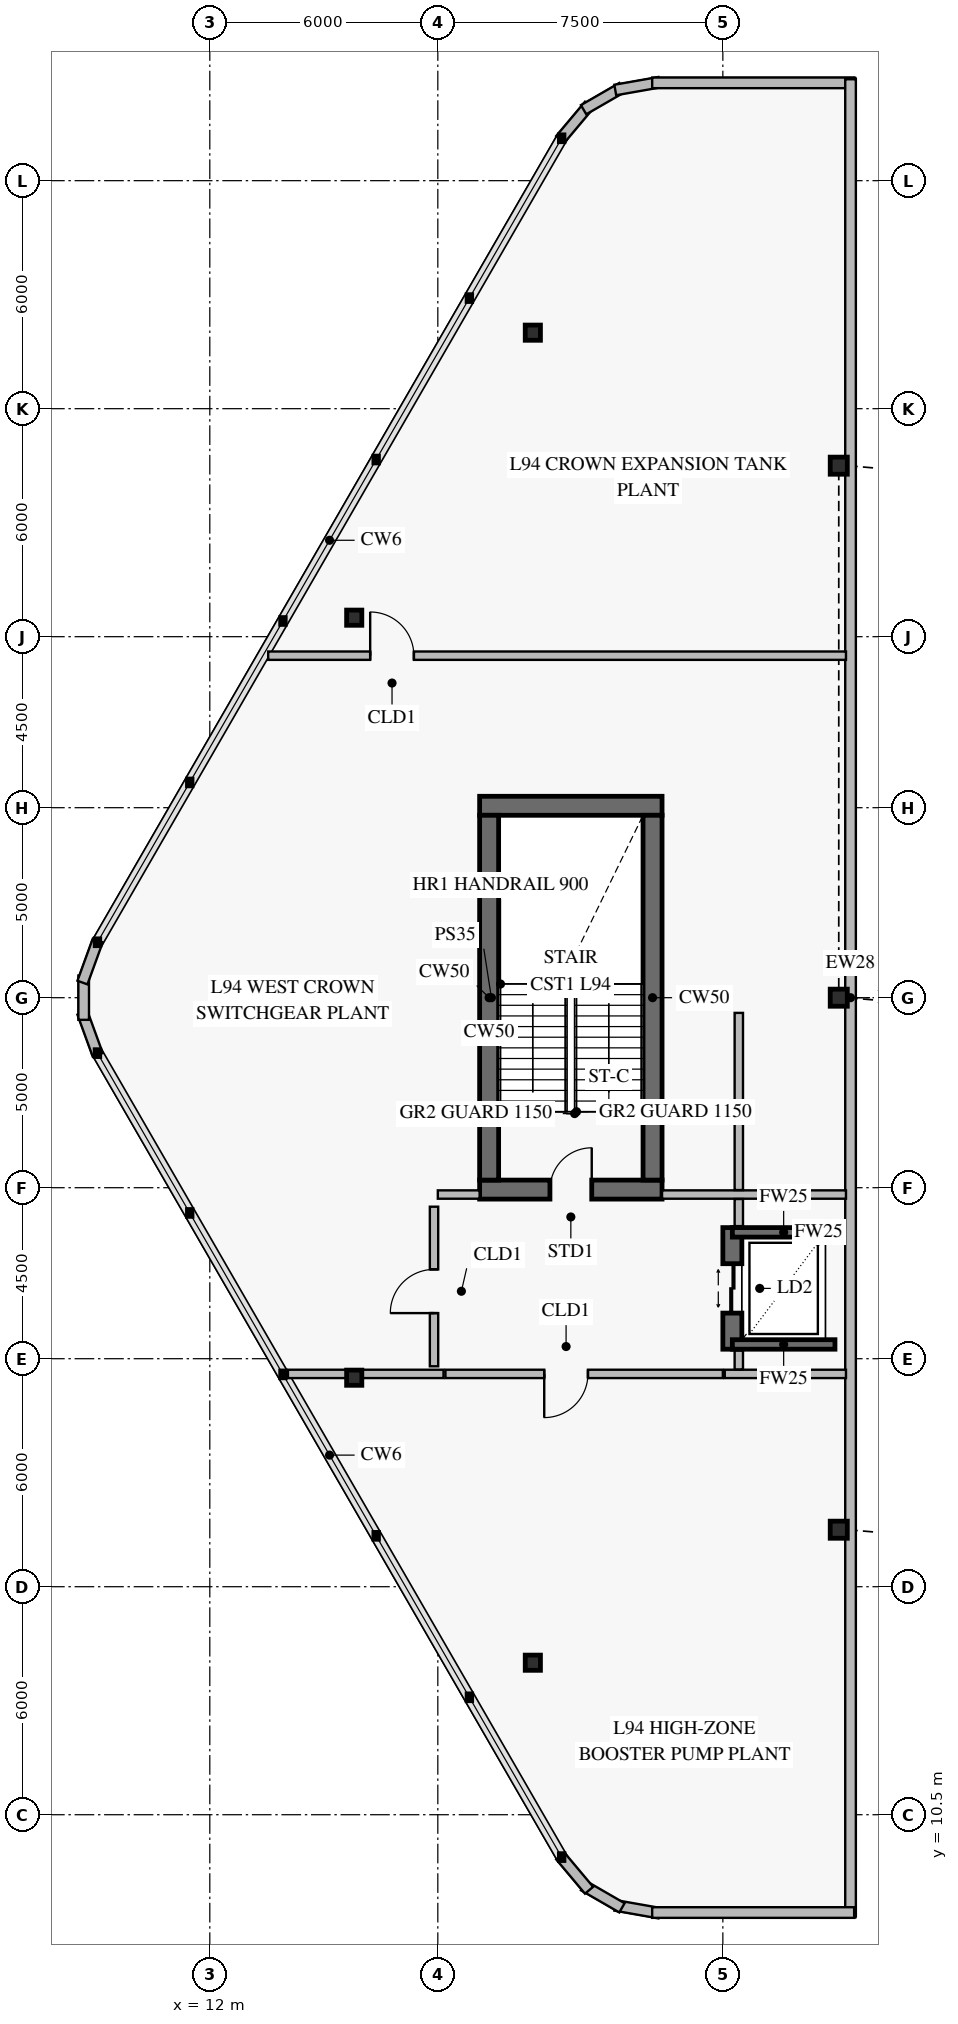
"""IFC4 building model, lengths in metres.
Left out: names, types, materials, properties, quantities, classifications, styles, units other than length and angle.
Written with IfcOpenShell. Run it as: python <this file> out.ifc"""

import sys

from ifc_helpers import new_model, si_unit, direction, frame, frame_2d, origin, origin_2d, place, context, subcontext, project, spatial, rectangle, hollow_rectangle, i_section, extrude, element, fill, save


model = new_model("IFC4")
c1 = context("Model", 3, precision=1e-05, world=origin(), true_north=direction((0.0, 1.0)))
c2 = subcontext(c1, "Body", "Model", "MODEL_VIEW")
j1 = project(units=[si_unit("LENGTHUNIT", "METRE"), si_unit("PLANEANGLEUNIT", "RADIAN")], contexts=[c1])
p1 = place(None, origin())
s1 = spatial("IfcSite", under=j1, at=p1, CompositionType="ELEMENT")
p2 = place(p1, origin())
s2 = spatial("IfcBuilding", under=s1, at=p2, CompositionType="ELEMENT")
p3 = place(p2, frame((0.0, 0.0, 370.2)))
s3 = spatial("IfcBuildingStorey", under=s2, at=p3, CompositionType="ELEMENT", Elevation=370.2)
p4 = place(p3, frame((19.1, 26.95, 0.0), z_axis=(0.0, 0.0, 1.0), x_axis=(1.0, 0.0, 0.0)))
e1 = element("IfcWall", 1, at=p4, inside=s3, PredefinedType="SHEAR", context=c2, shape_type="SweptSolid", body=[
    extrude(rectangle(XDim=4.8, YDim=0.5, at=frame_2d((2.4, 0.0))), origin(), (0.0, 0.0, 1.0), 4.4),
])
p5 = place(p4, frame((1.85, 0.0, 0.0)))
e2 = element("IfcOpeningElement", 2, at=p5, cuts=e1, PredefinedType="OPENING", context=c2, shape_type="SweptSolid", body=[
    extrude(rectangle(XDim=1.1, YDim=2.15, at=frame_2d((0.55, 1.075))), frame((0.0, 0.262, 0.0), z_axis=(0.0, -1.0, 0.0), x_axis=(1.0, 0.0, 0.0)), (0.0, 0.0, 1.0), 0.524),
])
p6 = place(p3, frame((23.9, 37.05, 0.0), z_axis=(0.0, 0.0, 1.0), x_axis=(-1.0, 0.0, 0.0)))
e3 = element("IfcWall", 3, at=p6, inside=s3, PredefinedType="SHEAR", context=c2, shape_type="SweptSolid", body=[
    extrude(rectangle(XDim=4.8, YDim=0.5, at=frame_2d((2.4, 0.0))), origin(), (0.0, 0.0, 1.0), 4.4),
])
for number, where, z_axis, x_axis in (
    (4, (19.35, 27.2, 0.0), (0.0, 0.0, 1.0), (0.0, 1.0, 0.0)),
    (5, (23.65, 36.8, 0.0), (0.0, 0.0, 1.0), (0.0, -1.0, 0.0)),
):
    element("IfcWall", number, at=place(p3, frame(where, z_axis=z_axis, x_axis=x_axis)), inside=s3, PredefinedType="SHEAR", context=c2, shape_type="SweptSolid", body=[
        extrude(rectangle(XDim=9.6, YDim=0.5, at=frame_2d((4.8, 0.0))), origin(), (0.0, 0.0, 1.0), 4.4),
    ])
p7 = place(p3, frame((25.75, 22.75, 0.0), z_axis=(0.0, 0.0, 1.0), x_axis=(0.0, 1.0, 0.0)))
e6 = element("IfcWall", 6, at=p7, inside=s3, PredefinedType="SHEAR", context=c2, shape_type="SweptSolid", body=[
    extrude(rectangle(XDim=3.2, YDim=0.5, at=frame_2d((1.6, 0.0))), origin(), (0.0, 0.0, 1.0), 4.4),
])
p8 = place(p7, frame((0.95, 0.0, 0.0)))
e7 = element("IfcOpeningElement", 7, at=p8, cuts=e6, PredefinedType="OPENING", context=c2, shape_type="SweptSolid", body=[
    extrude(rectangle(XDim=1.3, YDim=2.3, at=frame_2d((0.65, 1.15))), frame((0.0, 0.262, 0.0), z_axis=(0.0, -1.0, 0.0), x_axis=(1.0, 0.0, 0.0)), (0.0, 0.0, 1.0), 0.524),
])
for number, where, z_axis, x_axis in (
    (8, (15.8, 22.0, 0.0), (0.0, 0.0, 1.0), (1.0, 0.0, 0.0)),
    (9, (15.8, 42.0, 0.0), (0.0, 0.0, 1.0), (1.0, 0.0, 0.0)),
    (10, (20.5, 14.5, 0.0), (0.0, 0.0, 1.0), (1.0, 0.0, 0.0)),
    (11, (20.5, 49.5, 0.0), (0.0, 0.0, 1.0), (1.0, 0.0, 0.0)),
):
    element("IfcColumn", number, at=place(p3, frame(where, z_axis=z_axis, x_axis=x_axis)), inside=s3, PredefinedType="COLUMN", context=c2, shape_type="SweptSolid", body=[
        extrude(i_section(OverallWidth=0.4, OverallDepth=0.4, WebThickness=0.013, FlangeThickness=0.021, at=origin_2d()), origin(), (0.0, 0.0, 1.0), 4.05),
    ])
for number, where, z_axis, x_axis in (
    (12, (28.55, 18.0, 0.0), (0.0, 0.0, 1.0), (1.0, 0.0, 0.0)),
    (13, (28.55, 32.0, 0.0), (0.0, 0.0, 1.0), (1.0, 0.0, 0.0)),
    (14, (28.55, 46.0, 0.0), (0.0, 0.0, 1.0), (1.0, 0.0, 0.0)),
):
    element("IfcColumn", number, at=place(p3, frame(where, z_axis=z_axis, x_axis=x_axis)), inside=s3, PredefinedType="PILASTER", context=c2, shape_type="SweptSolid", body=[
        extrude(hollow_rectangle(XDim=0.45, YDim=0.45, WallThickness=0.022, at=origin_2d()), origin(), (0.0, 0.0, 1.0), 4.05),
    ])
p9 = place(p3, frame((23.829, 7.909, 0.0), z_axis=(0.0, 0.0, 1.0), x_axis=(-0.984798162481, 0.173702559495, 0.0)))
e15 = element("IfcWall", 15, at=p9, inside=s3, PredefinedType="SOLIDWALL", context=c2, shape_type="SweptSolid", body=[
    extrude(rectangle(XDim=1.178, YDim=0.28, at=frame_2d((0.589, 0.0))), origin(), (0.0, 0.0, 1.0), 4.05),
])
p10 = place(p3, frame((22.845, 8.05, 0.0), z_axis=(0.0, 0.0, 1.0), x_axis=(-0.865951785477, 0.500127488975, 0.0)))
e16 = element("IfcWall", 16, at=p10, inside=s3, PredefinedType="SOLIDWALL", context=c2, shape_type="SweptSolid", body=[
    extrude(rectangle(XDim=1.165, YDim=0.28, at=frame_2d((0.583, 0.0))), origin(), (0.0, 0.0, 1.0), 4.05),
])
for number, where, z_axis, x_axis in (
    (17, (21.979, 8.512, 0.0), (0.0, 0.0, 1.0), (-0.643, 0.766, 0.0)),
    (18, (9.052, 30.495, 0.0), (0.0, 0.0, 1.0), (-0.342, 0.94, 0.0)),
):
    element("IfcWall", number, at=place(p3, frame(where, z_axis=z_axis, x_axis=x_axis)), inside=s3, PredefinedType="SOLIDWALL", context=c2, shape_type="SweptSolid", body=[
        extrude(rectangle(XDim=1.178, YDim=0.28, at=frame_2d((0.589, 0.0))), origin(), (0.0, 0.0, 1.0), 4.05),
    ])
p11 = place(p3, frame((8.681, 31.417, 0.0), z_axis=(0.0, 0.0, 1.0), x_axis=(0.0, 1.0, 0.0)))
e19 = element("IfcWall", 19, at=p11, inside=s3, PredefinedType="SOLIDWALL", context=c2, shape_type="SweptSolid", body=[
    extrude(rectangle(XDim=1.165, YDim=0.28, at=frame_2d((0.583, 0.0))), origin(), (0.0, 0.0, 1.0), 4.05),
])
for number, where, z_axis, x_axis in (
    (20, (8.649, 32.398, 0.0), (0.0, 0.0, 1.0), (0.342, 0.94, 0.0)),
    (21, (21.222, 54.586, 0.0), (0.0, 0.0, 1.0), (0.643, 0.766, 0.0)),
):
    element("IfcWall", number, at=place(p3, frame(where, z_axis=z_axis, x_axis=x_axis)), inside=s3, PredefinedType="SOLIDWALL", context=c2, shape_type="SweptSolid", body=[
        extrude(rectangle(XDim=1.178, YDim=0.28, at=frame_2d((0.589, 0.0))), origin(), (0.0, 0.0, 1.0), 4.05),
    ])
p12 = place(p3, frame((21.836, 55.367, 0.0), z_axis=(0.0, 0.0, 1.0), x_axis=(0.865951785477, 0.500127488975, 0.0)))
e22 = element("IfcWall", 22, at=p12, inside=s3, PredefinedType="SOLIDWALL", context=c2, shape_type="SweptSolid", body=[
    extrude(rectangle(XDim=1.165, YDim=0.28, at=frame_2d((0.583, 0.0))), origin(), (0.0, 0.0, 1.0), 4.05),
])
p13 = place(p3, frame((22.669, 55.886, 0.0), z_axis=(0.0, 0.0, 1.0), x_axis=(0.984798162481, 0.173702559495, 0.0)))
e23 = element("IfcWall", 23, at=p13, inside=s3, PredefinedType="SOLIDWALL", context=c2, shape_type="SweptSolid", body=[
    extrude(rectangle(XDim=1.178, YDim=0.28, at=frame_2d((0.589, 0.0))), origin(), (0.0, 0.0, 1.0), 4.05),
])
p14 = place(p3, frame((23.64, 56.074, 0.0), z_axis=(0.0, 0.0, 1.0), x_axis=(1.0, 0.0, 0.0)))
e24 = element("IfcWall", 24, at=p14, inside=s3, PredefinedType="SOLIDWALL", context=c2, shape_type="SweptSolid", body=[
    extrude(rectangle(XDim=5.315, YDim=0.28, at=frame_2d((2.657, 0.0))), origin(), (0.0, 0.0, 1.0), 4.05),
])
p15 = place(p3, frame((28.86, 56.169, 0.0), z_axis=(0.0, 0.0, 1.0), x_axis=(0.0, -1.0, 0.0)))
e25 = element("IfcWall", 25, at=p15, inside=s3, PredefinedType="SOLIDWALL", context=c2, shape_type="SweptSolid", body=[
    extrude(rectangle(XDim=48.338, YDim=0.28, at=frame_2d((24.169, 0.0))), origin(), (0.0, 0.0, 1.0), 3.465),
])
p16 = place(p3, frame((28.955, 7.926, 0.0), z_axis=(0.0, 0.0, 1.0), x_axis=(-1.0, 0.0, 0.0)))
e26 = element("IfcWall", 26, at=p16, inside=s3, PredefinedType="SOLIDWALL", context=c2, shape_type="SweptSolid", body=[
    extrude(rectangle(XDim=5.315, YDim=0.28, at=frame_2d((2.657, 0.0))), origin(), (0.0, 0.0, 1.0), 4.05),
])
for number, where, z_axis, x_axis in (
    (27, (25.75, 25.825, 0.0), (0.0, 0.0, 1.0), (1.0, 0.0, 0.0)),
    (28, (25.75, 22.875, 0.0), (0.0, 0.0, 1.0), (1.0, 0.0, 0.0)),
):
    element("IfcWall", number, at=place(p3, frame(where, z_axis=z_axis, x_axis=x_axis)), inside=s3, PredefinedType="SOLIDWALL", context=c2, shape_type="SweptSolid", body=[
        extrude(rectangle(XDim=2.7, YDim=0.25, at=frame_2d((1.35, 0.0))), origin(), (0.0, 0.0, 1.0), 4.4),
    ])
p17 = place(p3, frame((13.536, 41.0, 0.0), z_axis=(0.0, 0.0, 1.0), x_axis=(1.0, 0.0, 0.0)))
e29 = element("IfcWall", 29, at=p17, inside=s3, PredefinedType="PARTITIONING", context=c2, shape_type="SweptSolid", body=[
    extrude(rectangle(XDim=15.204, YDim=0.22, at=frame_2d((7.602, 0.0))), origin(), (0.0, 0.0, 1.0), 3.47),
])
p18 = place(p17, frame((2.684, 0.0, 0.0)))
e30 = element("IfcOpeningElement", 30, at=p18, cuts=e29, PredefinedType="OPENING", context=c2, shape_type="SweptSolid", body=[
    extrude(rectangle(XDim=1.15, YDim=2.2, at=frame_2d((0.575, 1.1))), frame((0.0, 0.122, 0.0), z_axis=(0.0, -1.0, 0.0), x_axis=(1.0, 0.0, 0.0)), (0.0, 0.0, 1.0), 0.244),
])
p19 = place(p3, frame((18.2, 22.1, 0.0), z_axis=(0.0, 0.0, 1.0), x_axis=(1.0, 0.0, 0.0)))
e31 = element("IfcWall", 31, at=p19, inside=s3, PredefinedType="PARTITIONING", context=c2, shape_type="SweptSolid", body=[
    extrude(rectangle(XDim=7.3, YDim=0.22, at=frame_2d((3.65, 0.0))), origin(), (0.0, 0.0, 1.0), 4.05),
])
p20 = place(p19, frame((2.6, 0.0, 0.0)))
e32 = element("IfcOpeningElement", 32, at=p20, cuts=e31, PredefinedType="OPENING", context=c2, shape_type="SweptSolid", body=[
    extrude(rectangle(XDim=1.15, YDim=2.2, at=frame_2d((0.575, 1.1))), frame((0.0, 0.122, 0.0), z_axis=(0.0, -1.0, 0.0), x_axis=(1.0, 0.0, 0.0)), (0.0, 0.0, 1.0), 0.244),
])
p21 = place(p3, frame((17.9, 22.3, 0.0), z_axis=(0.0, 0.0, 1.0), x_axis=(0.0, 1.0, 0.0)))
e33 = element("IfcWall", 33, at=p21, inside=s3, PredefinedType="PARTITIONING", context=c2, shape_type="SweptSolid", body=[
    extrude(rectangle(XDim=4.2, YDim=0.22, at=frame_2d((2.1, 0.0))), origin(), (0.0, 0.0, 1.0), 4.05),
])
p22 = place(p21, frame((1.4, 0.0, 0.0)))
e34 = element("IfcOpeningElement", 34, at=p22, cuts=e33, PredefinedType="OPENING", context=c2, shape_type="SweptSolid", body=[
    extrude(rectangle(XDim=1.15, YDim=2.2, at=frame_2d((0.575, 1.1))), frame((0.0, 0.122, 0.0), z_axis=(0.0, -1.0, 0.0), x_axis=(1.0, 0.0, 0.0)), (0.0, 0.0, 1.0), 0.244),
])
p23 = place(p3, frame((14.056, 22.1, 0.0), z_axis=(0.0, 0.0, 1.0), x_axis=(1.0, 0.0, 0.0)))
e35 = element("IfcWall", 35, at=p23, inside=s3, PredefinedType="PARTITIONING", context=c2, shape_type="SweptSolid", body=[
    extrude(rectangle(XDim=4.094, YDim=0.22, at=frame_2d((2.047, 0.0))), origin(), (0.0, 0.0, 1.0), 3.47),
])
p24 = place(p3, frame((25.55, 22.1, 0.0), z_axis=(0.0, 0.0, 1.0), x_axis=(1.0, 0.0, 0.0)))
e36 = element("IfcWall", 36, at=p24, inside=s3, PredefinedType="PARTITIONING", context=c2, shape_type="SweptSolid", body=[
    extrude(rectangle(XDim=3.19, YDim=0.22, at=frame_2d((1.595, 0.0))), origin(), (0.0, 0.0, 1.0), 3.47),
])
p25 = place(p3, frame((28.74, 26.82, 0.0), z_axis=(0.0, 0.0, 1.0), x_axis=(-1.0, 0.0, 0.0)))
e37 = element("IfcWall", 37, at=p25, inside=s3, PredefinedType="PARTITIONING", context=c2, shape_type="SweptSolid", body=[
    extrude(rectangle(XDim=4.84, YDim=0.22, at=frame_2d((2.42, 0.0))), origin(), (0.0, 0.0, 1.0), 3.47),
])
p26 = place(p3, frame((19.1, 26.82, 0.0), z_axis=(0.0, 0.0, 1.0), x_axis=(-1.0, 0.0, 0.0)))
e38 = element("IfcWall", 38, at=p26, inside=s3, PredefinedType="PARTITIONING", context=c2, shape_type="SweptSolid", body=[
    extrude(rectangle(XDim=1.1, YDim=0.22, at=frame_2d((0.55, 0.0))), origin(), (0.0, 0.0, 1.0), 4.05),
])
p27 = place(p3, frame((25.92, 25.989, 0.0), z_axis=(0.0, 0.0, 1.0), x_axis=(0.0, 1.0, 0.0)))
e39 = element("IfcWall", 39, at=p27, inside=s3, PredefinedType="PARTITIONING", context=c2, shape_type="SweptSolid", body=[
    extrude(rectangle(XDim=0.713, YDim=0.22, at=frame_2d((0.356, 0.0))), origin(), (0.0, 0.0, 1.0), 4.05),
])
p28 = place(p3, frame((25.92, 26.938, 0.0), z_axis=(0.0, 0.0, 1.0), x_axis=(0.0, 1.0, 0.0)))
e40 = element("IfcWall", 40, at=p28, inside=s3, PredefinedType="PARTITIONING", context=c2, shape_type="SweptSolid", body=[
    extrude(rectangle(XDim=4.662, YDim=0.22, at=frame_2d((2.331, 0.0))), origin(), (0.0, 0.0, 1.0), 4.05),
])
p29 = place(p3, frame((25.92, 22.218, 0.0), z_axis=(0.0, 0.0, 1.0), x_axis=(0.0, 1.0, 0.0)))
e41 = element("IfcWall", 41, at=p29, inside=s3, PredefinedType="PARTITIONING", context=c2, shape_type="SweptSolid", body=[
    extrude(rectangle(XDim=0.493, YDim=0.22, at=frame_2d((0.247, 0.0))), origin(), (0.0, 0.0, 1.0), 4.05),
])
p30 = place(p8, origin())
e42 = element("IfcDoor", 42, at=p30, inside=s3, OperationType="DOUBLE_DOOR_SLIDING", PredefinedType="DOOR", context=c2, shape_type="SweptSolid", body=[
    extrude(rectangle(XDim=1.3, YDim=2.3, at=frame_2d((0.65, 1.15))), frame((0.0, 0.025, 0.0), z_axis=(0.0, -1.0, 0.0), x_axis=(1.0, 0.0, 0.0)), (0.0, 0.0, 1.0), 0.05),
])
fill(e7, e42)
p31 = place(p5, origin())
e43 = element("IfcDoor", 43, at=p31, inside=s3, OperationType="SINGLE_SWING_RIGHT", PredefinedType="USERDEFINED", context=c2, shape_type="SweptSolid", body=[
    extrude(rectangle(XDim=1.1, YDim=2.15, at=frame_2d((0.55, 1.075))), frame((0.0, 0.025, 0.0), z_axis=(0.0, -1.0, 0.0), x_axis=(1.0, 0.0, 0.0)), (0.0, 0.0, 1.0), 0.05),
])
fill(e2, e43)
p32 = place(p18, origin())
e44 = element("IfcDoor", 44, at=p32, inside=s3, OperationType="SINGLE_SWING_LEFT", PredefinedType="DOOR", context=c2, shape_type="SweptSolid", body=[
    extrude(rectangle(XDim=1.15, YDim=2.2, at=frame_2d((0.575, 1.1))), frame((0.0, 0.025, 0.0), z_axis=(0.0, -1.0, 0.0), x_axis=(1.0, 0.0, 0.0)), (0.0, 0.0, 1.0), 0.05),
])
fill(e30, e44)
p33 = place(p20, frame((1.15, 0.0, 0.0), z_axis=(0.0, 0.0, 1.0), x_axis=(-1.0, 0.0, 0.0)))
e45 = element("IfcDoor", 45, at=p33, inside=s3, OperationType="SINGLE_SWING_RIGHT", PredefinedType="DOOR", context=c2, shape_type="SweptSolid", body=[
    extrude(rectangle(XDim=1.15, YDim=2.2, at=frame_2d((0.575, 1.1))), frame((0.0, 0.025, 0.0), z_axis=(0.0, -1.0, 0.0), x_axis=(1.0, 0.0, 0.0)), (0.0, 0.0, 1.0), 0.05),
])
fill(e32, e45)
p34 = place(p22, origin())
e46 = element("IfcDoor", 46, at=p34, inside=s3, OperationType="SINGLE_SWING_LEFT", PredefinedType="DOOR", context=c2, shape_type="SweptSolid", body=[
    extrude(rectangle(XDim=1.15, YDim=2.2, at=frame_2d((0.575, 1.1))), frame((0.0, 0.025, 0.0), z_axis=(0.0, -1.0, 0.0), x_axis=(1.0, 0.0, 0.0)), (0.0, 0.0, 1.0), 0.05),
])
fill(e34, e46)
save(model, sys.argv[1])
